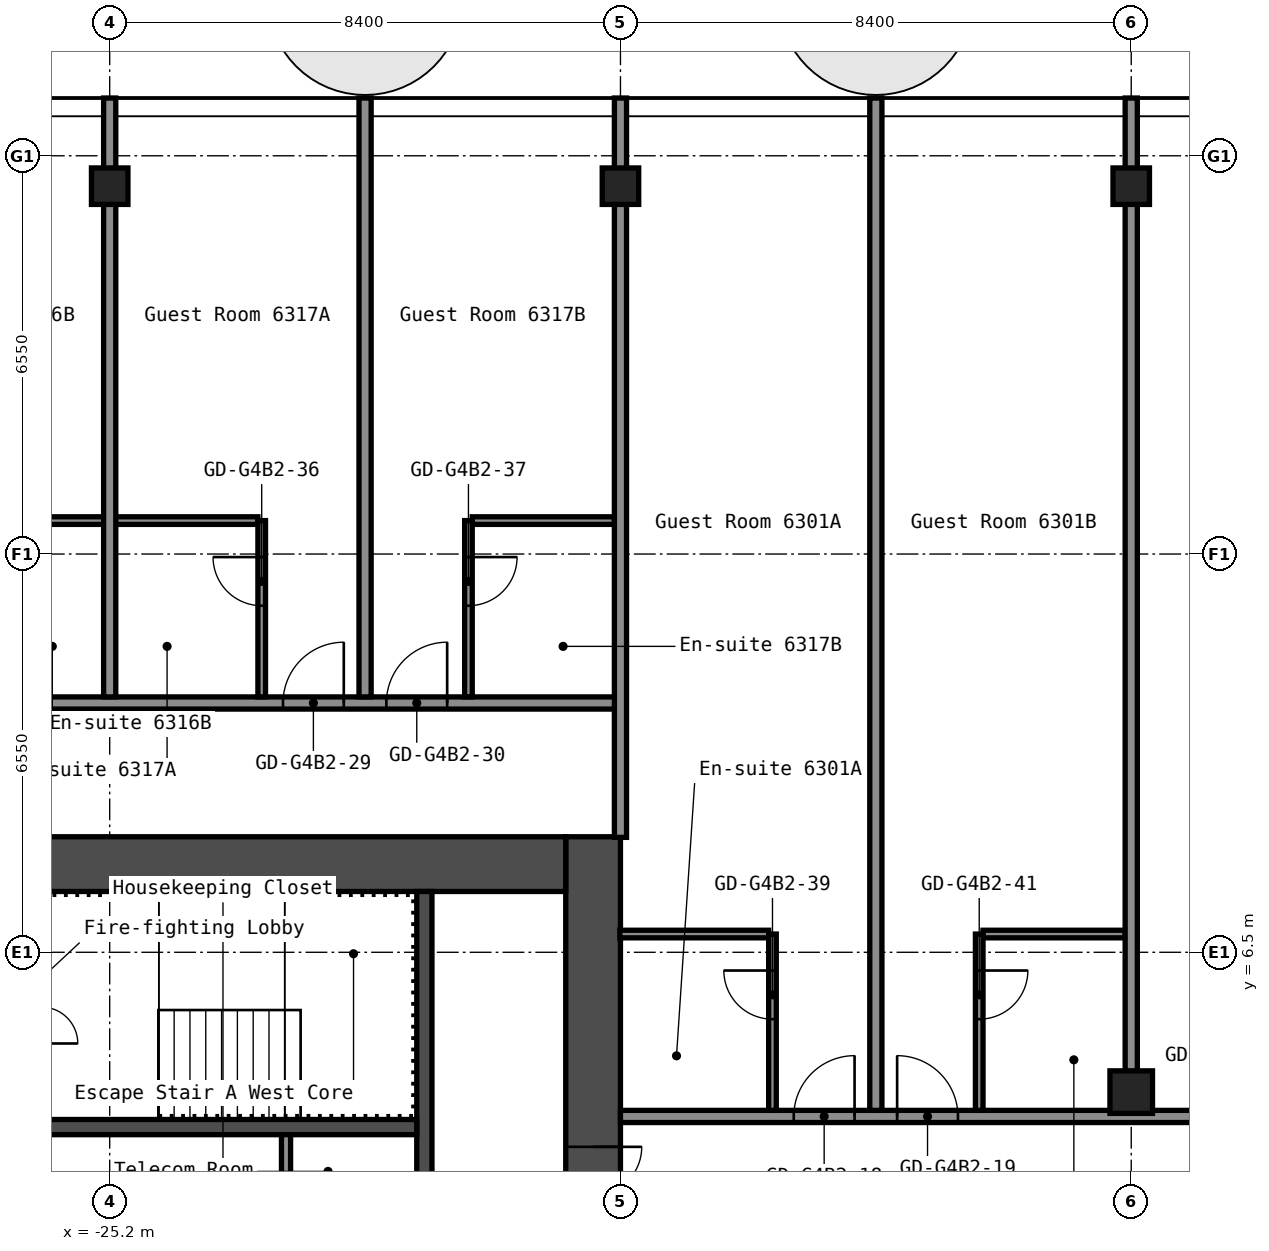
"""IFC4 building model, lengths in metres.
Left out: names, types, materials, properties, quantities, classifications, styles, units other than length and angle.
Written with IfcOpenShell. Run it as: python <this file> out.ifc"""

import sys

from ifc_helpers import new_model, si_unit, direction, frame, frame_2d, origin, origin_2d, place, context, subcontext, project, spatial, rectangle, hollow_rectangle, extrude, element, fill, save


model = new_model("IFC4")
c1 = context("Model", 3, precision=1e-05, world=origin(), true_north=direction((0.0, 1.0)))
c2 = subcontext(c1, "Body", "Model", "MODEL_VIEW")
j1 = project(units=[si_unit("LENGTHUNIT", "METRE"), si_unit("PLANEANGLEUNIT", "RADIAN")], contexts=[c1])
p1 = place(None, origin())
s1 = spatial("IfcSite", under=j1, at=p1, CompositionType="ELEMENT")
p2 = place(p1, origin())
s2 = spatial("IfcBuilding", under=s1, at=p2, CompositionType="ELEMENT")
p3 = place(p2, frame((0.0, 0.0, 221.8)))
s3 = spatial("IfcBuildingStorey", under=s2, at=p3, CompositionType="ELEMENT", Elevation=221.8)
for number, where, z_axis, x_axis in (
    (1, (-25.2, 19.1, 0.0), (0.0, 0.0, 1.0), (1.0, 0.0, 0.0)),
    (2, (-16.8, 19.1, 0.0), (0.0, 0.0, 1.0), (1.0, 0.0, 0.0)),
):
    element("IfcColumn", number, at=place(p3, frame(where, z_axis=z_axis, x_axis=x_axis)), inside=s3, PredefinedType="COLUMN", context=c2, shape_type="SweptSolid", body=[
        extrude(hollow_rectangle(XDim=0.6, YDim=0.6, WallThickness=0.025, InnerFilletRadius=0.038, OuterFilletRadius=0.062, at=origin_2d()), origin(), (0.0, 0.0, 1.0), 2.75),
    ])
p4 = place(p3, frame((-8.4, 4.2, 0.0), z_axis=(0.0, 0.0, 1.0), x_axis=(1.0, 0.0, 0.0)))
e3 = element("IfcColumn", 3, at=p4, inside=s3, PredefinedType="COLUMN", context=c2, shape_type="SweptSolid", body=[
    extrude(hollow_rectangle(XDim=0.7, YDim=0.7, WallThickness=0.028, at=origin_2d()), origin(), (0.0, 0.0, 1.0), 2.75),
])
p5 = place(p3, frame((-8.4, 19.1, 0.0), z_axis=(0.0, 0.0, 1.0), x_axis=(1.0, 0.0, 0.0)))
e4 = element("IfcColumn", 4, at=p5, inside=s3, PredefinedType="COLUMN", context=c2, shape_type="SweptSolid", body=[
    extrude(hollow_rectangle(XDim=0.6, YDim=0.6, WallThickness=0.025, InnerFilletRadius=0.038, OuterFilletRadius=0.062, at=origin_2d()), origin(), (0.0, 0.0, 1.0), 2.75),
])
p6 = place(p3, frame((-17.25, -8.4, 0.0), z_axis=(0.0, 0.0, 1.0), x_axis=(0.0, 1.0, 0.0)))
e5 = element("IfcWall", 5, at=p6, inside=s3, PredefinedType="SHEAR", context=c2, shape_type="SweptSolid", body=[
    extrude(rectangle(XDim=16.8, YDim=0.9, at=frame_2d((8.4, 0.0))), origin(), (0.0, 0.0, 1.0), 2.75),
])
p7 = place(p6, frame((10.1, 0.0, 0.0)))
e6 = element("IfcOpeningElement", 6, at=p7, cuts=e5, PredefinedType="OPENING", context=c2, shape_type="SweptSolid", body=[
    extrude(rectangle(XDim=1.6, YDim=2.1, at=frame_2d((0.8, 1.05))), frame((0.0, 0.46, 0.0), z_axis=(0.0, -1.0, 0.0), x_axis=(1.0, 0.0, 0.0)), (0.0, 0.0, 1.0), 0.92),
])
p8 = place(p3, frame((-32.7, 7.95, 0.0), z_axis=(0.0, 0.0, 1.0), x_axis=(1.0, 0.0, 0.0)))
e7 = element("IfcWall", 7, at=p8, inside=s3, PredefinedType="SHEAR", context=c2, shape_type="SweptSolid", body=[
    extrude(rectangle(XDim=15.0, YDim=0.9, at=frame_2d((7.5, 0.0))), origin(), (0.0, 0.0, 1.0), 2.75),
])
p9 = place(p8, frame((3.4, 0.0, 0.0)))
e8 = element("IfcOpeningElement", 8, at=p9, cuts=e7, PredefinedType="OPENING", context=c2, shape_type="SweptSolid", body=[
    extrude(rectangle(XDim=1.2, YDim=2.1, at=frame_2d((0.6, 1.05))), frame((0.0, 0.46, 0.0), z_axis=(0.0, -1.0, 0.0), x_axis=(1.0, 0.0, 0.0)), (0.0, 0.0, 1.0), 0.92),
])
p10 = place(p8, frame((0.75, 0.0, 0.0)))
e9 = element("IfcOpeningElement", 9, at=p10, cuts=e7, PredefinedType="OPENING", context=c2, shape_type="SweptSolid", body=[
    extrude(rectangle(XDim=0.9, YDim=2.1, at=frame_2d((0.45, 1.05))), frame((0.0, 0.46, 0.0), z_axis=(0.0, -1.0, 0.0), x_axis=(1.0, 0.0, 0.0)), (0.0, 0.0, 1.0), 0.92),
])
p11 = place(p3, frame((-20.025, 1.2, 0.0), z_axis=(0.0, 0.0, 1.0), x_axis=(0.0, 1.0, 0.0)))
e10 = element("IfcWall", 10, at=p11, inside=s3, PredefinedType="SHEAR", context=c2, shape_type="SweptSolid", body=[
    extrude(rectangle(XDim=6.3, YDim=0.25, at=frame_2d((3.15, 0.0))), origin(), (0.0, 0.0, 1.0), 2.75),
])
p12 = place(p3, frame((-27.65, 3.625, 0.0), z_axis=(0.0, 0.0, 1.0), x_axis=(1.0, 0.0, 0.0)))
e11 = element("IfcWall", 11, at=p12, inside=s3, PredefinedType="SHEAR", context=c2, shape_type="SweptSolid", body=[
    extrude(rectangle(XDim=7.5, YDim=0.25, at=frame_2d((3.75, 0.0))), origin(), (0.0, 0.0, 1.0), 2.75),
])
p13 = place(p3, frame((-22.3, 1.45, 0.0), z_axis=(0.0, 0.0, 1.0), x_axis=(0.0, 1.0, 0.0)))
e12 = element("IfcWall", 12, at=p13, inside=s3, PredefinedType="PARTITIONING", context=c2, shape_type="SweptSolid", body=[
    extrude(rectangle(XDim=2.05, YDim=0.15, at=frame_2d((1.025, 0.0))), origin(), (0.0, 0.0, 1.0), 2.75),
])
p14 = place(p3, frame((-16.8, 3.8, 0.0), z_axis=(0.0, 0.0, 1.0), x_axis=(1.0, 0.0, 0.0)))
e13 = element("IfcWall", 13, at=p14, inside=s3, PredefinedType="PARTITIONING", context=c2, shape_type="SweptSolid", body=[
    extrude(rectangle(XDim=33.6, YDim=0.2, at=frame_2d((16.8, 0.0))), origin(), (0.0, 0.0, 1.0), 2.75),
])
p15 = place(p14, frame((2.85, 0.0, 0.0)))
e14 = element("IfcOpeningElement", 14, at=p15, cuts=e13, PredefinedType="OPENING", context=c2, shape_type="SweptSolid", body=[
    extrude(rectangle(XDim=1.0, YDim=2.1, at=frame_2d((0.5, 1.05))), frame((0.0, 0.11, 0.0), z_axis=(0.0, -1.0, 0.0), x_axis=(1.0, 0.0, 0.0)), (0.0, 0.0, 1.0), 0.22),
])
p16 = place(p14, frame((4.55, 0.0, 0.0)))
e15 = element("IfcOpeningElement", 15, at=p16, cuts=e13, PredefinedType="OPENING", context=c2, shape_type="SweptSolid", body=[
    extrude(rectangle(XDim=1.0, YDim=2.1, at=frame_2d((0.5, 1.05))), frame((0.0, 0.11, 0.0), z_axis=(0.0, -1.0, 0.0), x_axis=(1.0, 0.0, 0.0)), (0.0, 0.0, 1.0), 0.22),
])
p17 = place(p14, frame((9.46, 0.0, 0.0)))
e16 = element("IfcOpeningElement", 16, at=p17, cuts=e13, PredefinedType="OPENING", context=c2, shape_type="SweptSolid", body=[
    extrude(rectangle(XDim=0.9, YDim=2.1, at=frame_2d((0.45, 1.05))), frame((0.0, 0.11, 0.0), z_axis=(0.0, -1.0, 0.0), x_axis=(1.0, 0.0, 0.0)), (0.0, 0.0, 1.0), 0.22),
])
p18 = place(p14, frame((13.66, 0.0, 0.0)))
e17 = element("IfcOpeningElement", 17, at=p18, cuts=e13, PredefinedType="OPENING", context=c2, shape_type="SweptSolid", body=[
    extrude(rectangle(XDim=0.9, YDim=2.1, at=frame_2d((0.45, 1.05))), frame((0.0, 0.11, 0.0), z_axis=(0.0, -1.0, 0.0), x_axis=(1.0, 0.0, 0.0)), (0.0, 0.0, 1.0), 0.22),
])
p19 = place(p14, frame((19.65, 0.0, 0.0)))
e18 = element("IfcOpeningElement", 18, at=p19, cuts=e13, PredefinedType="OPENING", context=c2, shape_type="SweptSolid", body=[
    extrude(rectangle(XDim=1.0, YDim=2.1, at=frame_2d((0.5, 1.05))), frame((0.0, 0.11, 0.0), z_axis=(0.0, -1.0, 0.0), x_axis=(1.0, 0.0, 0.0)), (0.0, 0.0, 1.0), 0.22),
])
p20 = place(p14, frame((21.35, 0.0, 0.0)))
e19 = element("IfcOpeningElement", 19, at=p20, cuts=e13, PredefinedType="OPENING", context=c2, shape_type="SweptSolid", body=[
    extrude(rectangle(XDim=1.0, YDim=2.1, at=frame_2d((0.5, 1.05))), frame((0.0, 0.11, 0.0), z_axis=(0.0, -1.0, 0.0), x_axis=(1.0, 0.0, 0.0)), (0.0, 0.0, 1.0), 0.22),
])
p21 = place(p14, frame((28.05, 0.0, 0.0)))
e20 = element("IfcOpeningElement", 20, at=p21, cuts=e13, PredefinedType="OPENING", context=c2, shape_type="SweptSolid", body=[
    extrude(rectangle(XDim=1.0, YDim=2.1, at=frame_2d((0.5, 1.05))), frame((0.0, 0.11, 0.0), z_axis=(0.0, -1.0, 0.0), x_axis=(1.0, 0.0, 0.0)), (0.0, 0.0, 1.0), 0.22),
])
p22 = place(p14, frame((29.75, 0.0, 0.0)))
e21 = element("IfcOpeningElement", 21, at=p22, cuts=e13, PredefinedType="OPENING", context=c2, shape_type="SweptSolid", body=[
    extrude(rectangle(XDim=1.0, YDim=2.1, at=frame_2d((0.5, 1.05))), frame((0.0, 0.11, 0.0), z_axis=(0.0, -1.0, 0.0), x_axis=(1.0, 0.0, 0.0)), (0.0, 0.0, 1.0), 0.22),
])
p23 = place(p3, frame((-16.81, 6.8, 0.0), z_axis=(0.0, 0.0, 1.0), x_axis=(1.0, 0.0, 0.0)))
e22 = element("IfcWall", 22, at=p23, inside=s3, PredefinedType="PARTITIONING", context=c2, shape_type="SweptSolid", body=[
    extrude(rectangle(XDim=2.448, YDim=0.125, at=frame_2d((1.224, 0.0))), origin(), (0.0, 0.0, 1.0), 2.75),
])
p24 = place(p3, frame((-10.837, 6.8, 0.0), z_axis=(0.0, 0.0, 1.0), x_axis=(1.0, 0.0, 0.0)))
e23 = element("IfcWall", 23, at=p24, inside=s3, PredefinedType="PARTITIONING", context=c2, shape_type="SweptSolid", body=[
    extrude(rectangle(XDim=2.337, YDim=0.125, at=frame_2d((1.169, 0.0))), origin(), (0.0, 0.0, 1.0), 2.75),
])
p25 = place(p3, frame((-38.1, 10.6, 0.0), z_axis=(0.0, 0.0, 1.0), x_axis=(1.0, 0.0, 0.0)))
e24 = element("IfcWall", 24, at=p25, inside=s3, PredefinedType="PARTITIONING", context=c2, shape_type="SweptSolid", body=[
    extrude(rectangle(XDim=21.3, YDim=0.2, at=frame_2d((10.65, 0.0))), origin(), (0.0, 0.0, 1.0), 2.75),
])
p26 = place(p25, frame((1.95, 0.0, 0.0)))
e25 = element("IfcOpeningElement", 25, at=p26, cuts=e24, PredefinedType="OPENING", context=c2, shape_type="SweptSolid", body=[
    extrude(rectangle(XDim=0.9, YDim=2.1, at=frame_2d((0.45, 1.05))), frame((0.0, 0.11, 0.0), z_axis=(0.0, -1.0, 0.0), x_axis=(1.0, 0.0, 0.0)), (0.0, 0.0, 1.0), 0.22),
])
p27 = place(p25, frame((7.35, 0.0, 0.0)))
e26 = element("IfcOpeningElement", 26, at=p27, cuts=e24, PredefinedType="OPENING", context=c2, shape_type="SweptSolid", body=[
    extrude(rectangle(XDim=1.0, YDim=2.1, at=frame_2d((0.5, 1.05))), frame((0.0, 0.11, 0.0), z_axis=(0.0, -1.0, 0.0), x_axis=(1.0, 0.0, 0.0)), (0.0, 0.0, 1.0), 0.22),
])
p28 = place(p25, frame((9.05, 0.0, 0.0)))
e27 = element("IfcOpeningElement", 27, at=p28, cuts=e24, PredefinedType="OPENING", context=c2, shape_type="SweptSolid", body=[
    extrude(rectangle(XDim=1.0, YDim=2.1, at=frame_2d((0.5, 1.05))), frame((0.0, 0.11, 0.0), z_axis=(0.0, -1.0, 0.0), x_axis=(1.0, 0.0, 0.0)), (0.0, 0.0, 1.0), 0.22),
])
p29 = place(p25, frame((15.75, 0.0, 0.0)))
e28 = element("IfcOpeningElement", 28, at=p29, cuts=e24, PredefinedType="OPENING", context=c2, shape_type="SweptSolid", body=[
    extrude(rectangle(XDim=1.0, YDim=2.1, at=frame_2d((0.5, 1.05))), frame((0.0, 0.11, 0.0), z_axis=(0.0, -1.0, 0.0), x_axis=(1.0, 0.0, 0.0)), (0.0, 0.0, 1.0), 0.22),
])
p30 = place(p25, frame((17.45, 0.0, 0.0)))
e29 = element("IfcOpeningElement", 29, at=p30, cuts=e24, PredefinedType="OPENING", context=c2, shape_type="SweptSolid", body=[
    extrude(rectangle(XDim=1.0, YDim=2.1, at=frame_2d((0.5, 1.05))), frame((0.0, 0.11, 0.0), z_axis=(0.0, -1.0, 0.0), x_axis=(1.0, 0.0, 0.0)), (0.0, 0.0, 1.0), 0.22),
])
p31 = place(p3, frame((-27.637, 13.6, 0.0), z_axis=(0.0, 0.0, 1.0), x_axis=(1.0, 0.0, 0.0)))
e30 = element("IfcWall", 30, at=p31, inside=s3, PredefinedType="PARTITIONING", context=c2, shape_type="SweptSolid", body=[
    extrude(rectangle(XDim=4.875, YDim=0.125, at=frame_2d((2.438, 0.0))), origin(), (0.0, 0.0, 1.0), 2.75),
])
p32 = place(p3, frame((-19.238, 13.6, 0.0), z_axis=(0.0, 0.0, 1.0), x_axis=(1.0, 0.0, 0.0)))
e31 = element("IfcWall", 31, at=p32, inside=s3, PredefinedType="PARTITIONING", context=c2, shape_type="SweptSolid", body=[
    extrude(rectangle(XDim=2.338, YDim=0.125, at=frame_2d((1.169, 0.0))), origin(), (0.0, 0.0, 1.0), 2.75),
])
p33 = place(p3, frame((-25.2, 10.7, 0.0), z_axis=(0.0, 0.0, 1.0), x_axis=(0.0, 1.0, 0.0)))
e32 = element("IfcWall", 32, at=p33, inside=s3, PredefinedType="PARTITIONING", context=c2, shape_type="SweptSolid", body=[
    extrude(rectangle(XDim=9.85, YDim=0.2, at=frame_2d((4.925, 0.0))), origin(), (0.0, 0.0, 1.0), 2.75),
])
p34 = place(p3, frame((-22.7, 10.7, 0.0), z_axis=(0.0, 0.0, 1.0), x_axis=(0.0, 1.0, 0.0)))
e33 = element("IfcWall", 33, at=p34, inside=s3, PredefinedType="PARTITIONING", context=c2, shape_type="SweptSolid", body=[
    extrude(rectangle(XDim=2.9, YDim=0.125, at=frame_2d((1.45, 0.0))), origin(), (0.0, 0.0, 1.0), 2.75),
])
p35 = place(p34, frame((1.5, 0.0, 0.0)))
e34 = element("IfcOpeningElement", 34, at=p35, cuts=e33, PredefinedType="OPENING", context=c2, shape_type="SweptSolid", body=[
    extrude(rectangle(XDim=0.8, YDim=2.1, at=frame_2d((0.4, 1.05))), frame((0.0, 0.073, 0.0), z_axis=(0.0, -1.0, 0.0), x_axis=(1.0, 0.0, 0.0)), (0.0, 0.0, 1.0), 0.145),
])
p36 = place(p3, frame((-21.0, 10.7, 0.0), z_axis=(0.0, 0.0, 1.0), x_axis=(0.0, 1.0, 0.0)))
e35 = element("IfcWall", 35, at=p36, inside=s3, PredefinedType="PARTITIONING", context=c2, shape_type="SweptSolid", body=[
    extrude(rectangle(XDim=9.85, YDim=0.2, at=frame_2d((4.925, 0.0))), origin(), (0.0, 0.0, 1.0), 2.75),
])
p37 = place(p3, frame((-19.3, 10.7, 0.0), z_axis=(0.0, 0.0, 1.0), x_axis=(0.0, 1.0, 0.0)))
e36 = element("IfcWall", 36, at=p37, inside=s3, PredefinedType="PARTITIONING", context=c2, shape_type="SweptSolid", body=[
    extrude(rectangle(XDim=2.9, YDim=0.125, at=frame_2d((1.45, 0.0))), origin(), (0.0, 0.0, 1.0), 2.75),
])
p38 = place(p37, frame((1.5, 0.0, 0.0)))
e37 = element("IfcOpeningElement", 37, at=p38, cuts=e36, PredefinedType="OPENING", context=c2, shape_type="SweptSolid", body=[
    extrude(rectangle(XDim=0.8, YDim=2.1, at=frame_2d((0.4, 1.05))), frame((0.0, 0.073, 0.0), z_axis=(0.0, -1.0, 0.0), x_axis=(1.0, 0.0, 0.0)), (0.0, 0.0, 1.0), 0.145),
])
p39 = place(p3, frame((-16.8, 8.39, 0.0), z_axis=(0.0, 0.0, 1.0), x_axis=(0.0, 1.0, 0.0)))
e38 = element("IfcWall", 38, at=p39, inside=s3, PredefinedType="PARTITIONING", context=c2, shape_type="SweptSolid", body=[
    extrude(rectangle(XDim=12.16, YDim=0.2, at=frame_2d((6.08, 0.0))), origin(), (0.0, 0.0, 1.0), 2.75),
])
p40 = place(p3, frame((-14.3, 3.9, 0.0), z_axis=(0.0, 0.0, 1.0), x_axis=(0.0, 1.0, 0.0)))
e39 = element("IfcWall", 39, at=p40, inside=s3, PredefinedType="PARTITIONING", context=c2, shape_type="SweptSolid", body=[
    extrude(rectangle(XDim=2.9, YDim=0.125, at=frame_2d((1.45, 0.0))), origin(), (0.0, 0.0, 1.0), 2.75),
])
p41 = place(p40, frame((1.5, 0.0, 0.0)))
e40 = element("IfcOpeningElement", 40, at=p41, cuts=e39, PredefinedType="OPENING", context=c2, shape_type="SweptSolid", body=[
    extrude(rectangle(XDim=0.8, YDim=2.1, at=frame_2d((0.4, 1.05))), frame((0.0, 0.073, 0.0), z_axis=(0.0, -1.0, 0.0), x_axis=(1.0, 0.0, 0.0)), (0.0, 0.0, 1.0), 0.145),
])
p42 = place(p3, frame((-12.6, 3.9, 0.0), z_axis=(0.0, 0.0, 1.0), x_axis=(0.0, 1.0, 0.0)))
e41 = element("IfcWall", 41, at=p42, inside=s3, PredefinedType="PARTITIONING", context=c2, shape_type="SweptSolid", body=[
    extrude(rectangle(XDim=16.65, YDim=0.2, at=frame_2d((8.325, 0.0))), origin(), (0.0, 0.0, 1.0), 2.75),
])
p43 = place(p3, frame((-10.9, 3.9, 0.0), z_axis=(0.0, 0.0, 1.0), x_axis=(0.0, 1.0, 0.0)))
e42 = element("IfcWall", 42, at=p43, inside=s3, PredefinedType="PARTITIONING", context=c2, shape_type="SweptSolid", body=[
    extrude(rectangle(XDim=2.9, YDim=0.125, at=frame_2d((1.45, 0.0))), origin(), (0.0, 0.0, 1.0), 2.75),
])
p44 = place(p43, frame((1.5, 0.0, 0.0)))
e43 = element("IfcOpeningElement", 43, at=p44, cuts=e42, PredefinedType="OPENING", context=c2, shape_type="SweptSolid", body=[
    extrude(rectangle(XDim=0.8, YDim=2.1, at=frame_2d((0.4, 1.05))), frame((0.0, 0.073, 0.0), z_axis=(0.0, -1.0, 0.0), x_axis=(1.0, 0.0, 0.0)), (0.0, 0.0, 1.0), 0.145),
])
p45 = place(p3, frame((-8.4, 4.54, 0.0), z_axis=(0.0, 0.0, 1.0), x_axis=(0.0, 1.0, 0.0)))
e44 = element("IfcWall", 44, at=p45, inside=s3, PredefinedType="PARTITIONING", context=c2, shape_type="SweptSolid", body=[
    extrude(rectangle(XDim=16.01, YDim=0.2, at=frame_2d((8.005, 0.0))), origin(), (0.0, 0.0, 1.0), 2.75),
])
p46 = place(p7, origin())
e45 = element("IfcDoor", 45, at=p46, inside=s3, OperationType="DOUBLE_DOOR_SINGLE_SWING", PredefinedType="DOOR", context=c2, shape_type="SweptSolid", body=[
    extrude(rectangle(XDim=1.6, YDim=2.1, at=frame_2d((0.8, 1.05))), frame((0.0, 0.025, 0.0), z_axis=(0.0, -1.0, 0.0), x_axis=(1.0, 0.0, 0.0)), (0.0, 0.0, 1.0), 0.05),
])
fill(e6, e45)
p47 = place(p15, origin())
e46 = element("IfcDoor", 46, at=p47, inside=s3, OperationType="SINGLE_SWING_LEFT", PredefinedType="DOOR", context=c2, shape_type="SweptSolid", body=[
    extrude(rectangle(XDim=1.0, YDim=2.1, at=frame_2d((0.5, 1.05))), frame((0.0, 0.025, 0.0), z_axis=(0.0, -1.0, 0.0), x_axis=(1.0, 0.0, 0.0)), (0.0, 0.0, 1.0), 0.05),
])
fill(e14, e46)
p48 = place(p16, origin())
e47 = element("IfcDoor", 47, at=p48, inside=s3, OperationType="SINGLE_SWING_RIGHT", PredefinedType="DOOR", context=c2, shape_type="SweptSolid", body=[
    extrude(rectangle(XDim=1.0, YDim=2.1, at=frame_2d((0.5, 1.05))), frame((0.0, 0.025, 0.0), z_axis=(0.0, -1.0, 0.0), x_axis=(1.0, 0.0, 0.0)), (0.0, 0.0, 1.0), 0.05),
])
fill(e15, e47)
p49 = place(p29, origin())
e48 = element("IfcDoor", 48, at=p49, inside=s3, OperationType="SINGLE_SWING_LEFT", PredefinedType="DOOR", context=c2, shape_type="SweptSolid", body=[
    extrude(rectangle(XDim=1.0, YDim=2.1, at=frame_2d((0.5, 1.05))), frame((0.0, 0.025, 0.0), z_axis=(0.0, -1.0, 0.0), x_axis=(1.0, 0.0, 0.0)), (0.0, 0.0, 1.0), 0.05),
])
fill(e28, e48)
p50 = place(p30, origin())
e49 = element("IfcDoor", 49, at=p50, inside=s3, OperationType="SINGLE_SWING_LEFT", PredefinedType="DOOR", context=c2, shape_type="SweptSolid", body=[
    extrude(rectangle(XDim=1.0, YDim=2.1, at=frame_2d((0.5, 1.05))), frame((0.0, 0.025, 0.0), z_axis=(0.0, -1.0, 0.0), x_axis=(1.0, 0.0, 0.0)), (0.0, 0.0, 1.0), 0.05),
])
fill(e29, e49)
p51 = place(p35, origin())
e50 = element("IfcDoor", 50, at=p51, inside=s3, OperationType="SINGLE_SWING_LEFT", PredefinedType="DOOR", context=c2, shape_type="SweptSolid", body=[
    extrude(rectangle(XDim=0.8, YDim=2.1, at=frame_2d((0.4, 1.05))), frame((0.0, 0.025, 0.0), z_axis=(0.0, -1.0, 0.0), x_axis=(1.0, 0.0, 0.0)), (0.0, 0.0, 1.0), 0.05),
])
fill(e34, e50)
p52 = place(p38, origin())
e51 = element("IfcDoor", 51, at=p52, inside=s3, OperationType="SINGLE_SWING_RIGHT", PredefinedType="DOOR", context=c2, shape_type="SweptSolid", body=[
    extrude(rectangle(XDim=0.8, YDim=2.1, at=frame_2d((0.4, 1.05))), frame((0.0, 0.025, 0.0), z_axis=(0.0, -1.0, 0.0), x_axis=(1.0, 0.0, 0.0)), (0.0, 0.0, 1.0), 0.05),
])
fill(e37, e51)
p53 = place(p41, origin())
e52 = element("IfcDoor", 52, at=p53, inside=s3, OperationType="SINGLE_SWING_LEFT", PredefinedType="DOOR", context=c2, shape_type="SweptSolid", body=[
    extrude(rectangle(XDim=0.8, YDim=2.1, at=frame_2d((0.4, 1.05))), frame((0.0, 0.025, 0.0), z_axis=(0.0, -1.0, 0.0), x_axis=(1.0, 0.0, 0.0)), (0.0, 0.0, 1.0), 0.05),
])
fill(e40, e52)
p54 = place(p44, origin())
e53 = element("IfcDoor", 53, at=p54, inside=s3, OperationType="SINGLE_SWING_RIGHT", PredefinedType="DOOR", context=c2, shape_type="SweptSolid", body=[
    extrude(rectangle(XDim=0.8, YDim=2.1, at=frame_2d((0.4, 1.05))), frame((0.0, 0.025, 0.0), z_axis=(0.0, -1.0, 0.0), x_axis=(1.0, 0.0, 0.0)), (0.0, 0.0, 1.0), 0.05),
])
fill(e43, e53)
save(model, sys.argv[1])
